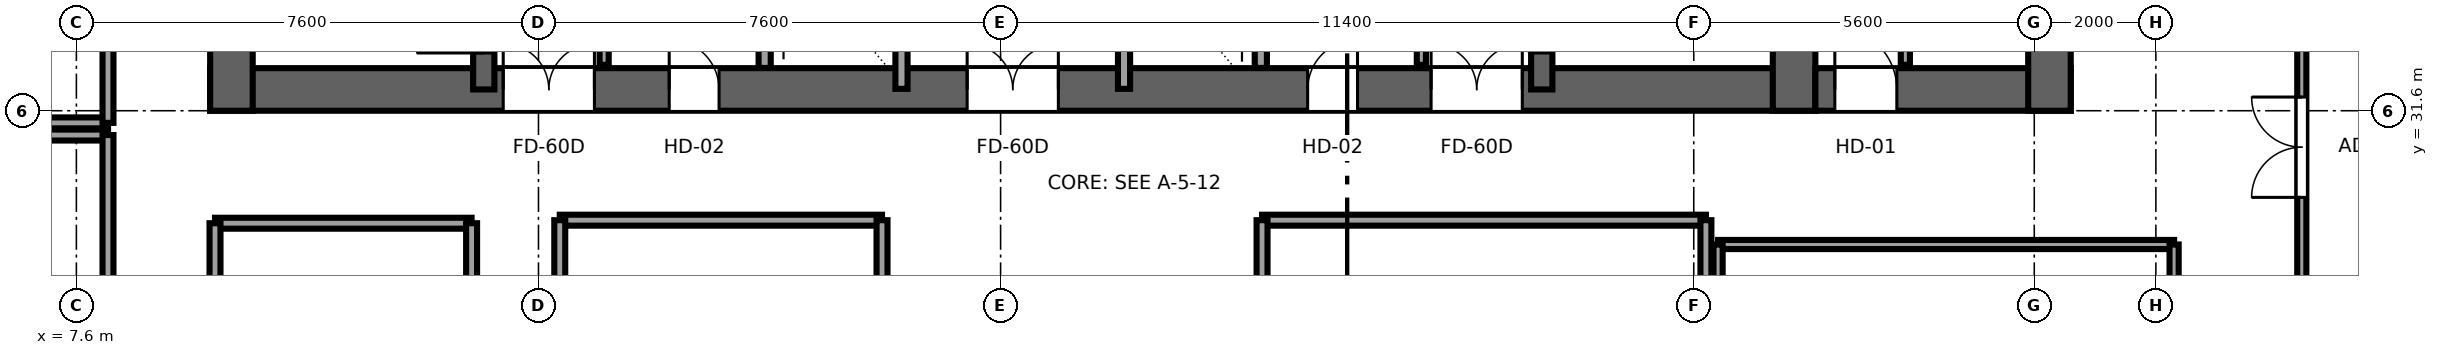
"""IFC4 building model, lengths in metres.
Left out: names, types, materials, properties, quantities, classifications, styles, units other than length and angle.
Written with IfcOpenShell. Run it as: python <this file> out.ifc"""

import sys

from ifc_helpers import new_model, si_unit, direction, frame, frame_2d, origin, place, context, subcontext, project, spatial, rectangle, extrude, source, transform, mapped, element, fill, save


model = new_model("IFC4")
c1 = context("Model", 3, precision=1e-05, world=origin(), true_north=direction((0.0, 1.0)))
c2 = subcontext(c1, "Body", "Model", "MODEL_VIEW")
j1 = project(units=[si_unit("LENGTHUNIT", "METRE"), si_unit("PLANEANGLEUNIT", "RADIAN")], contexts=[c1])
p1 = place(None, origin())
s1 = spatial("IfcSite", under=j1, at=p1, CompositionType="ELEMENT")
p2 = place(p1, origin())
s2 = spatial("IfcBuilding", under=s1, at=p2, CompositionType="ELEMENT")
p3 = place(p2, frame((0.0, 0.0, 125.75)))
s3 = spatial("IfcBuildingStorey", under=s2, at=p3, CompositionType="ELEMENT", Elevation=125.75)
p4 = place(p3, frame((9.8, 31.95, 0.0), z_axis=(0.0, 0.0, 1.0), x_axis=(1.0, 0.0, 0.0)))
e1 = element("IfcWall", 1, at=p4, inside=s3, PredefinedType="SHEAR", context=c2, shape_type="SweptSolid", body=[
    extrude(rectangle(XDim=26.4, YDim=0.7, at=frame_2d((13.2, 0.0))), origin(), (0.0, 0.0, 1.0), 3.55),
])
p5 = place(p4, frame((6.32, 0.0, 0.0), z_axis=(0.0, 0.0, 1.0), x_axis=(-1.0, 0.0, 0.0)))
e2 = element("IfcOpeningElement", 2, at=p5, cuts=e1, PredefinedType="OPENING", context=c2, shape_type="SweptSolid", body=[
    extrude(rectangle(XDim=1.5, YDim=2.04, at=frame_2d((0.75, 1.02))), frame((0.0, 0.36, 0.0), z_axis=(0.0, -1.0, 0.0), x_axis=(1.0, 0.0, 0.0)), (0.0, 0.0, 1.0), 0.72),
])
p6 = place(p4, frame((13.95, 0.0, 0.0), z_axis=(0.0, 0.0, 1.0), x_axis=(-1.0, 0.0, 0.0)))
e3 = element("IfcOpeningElement", 3, at=p6, cuts=e1, PredefinedType="OPENING", context=c2, shape_type="SweptSolid", body=[
    extrude(rectangle(XDim=1.5, YDim=2.04, at=frame_2d((0.75, 1.02))), frame((0.0, 0.36, 0.0), z_axis=(0.0, -1.0, 0.0), x_axis=(1.0, 0.0, 0.0)), (0.0, 0.0, 1.0), 0.72),
])
p7 = place(p4, frame((21.58, 0.0, 0.0), z_axis=(0.0, 0.0, 1.0), x_axis=(-1.0, 0.0, 0.0)))
e4 = element("IfcOpeningElement", 4, at=p7, cuts=e1, PredefinedType="OPENING", context=c2, shape_type="SweptSolid", body=[
    extrude(rectangle(XDim=1.5, YDim=2.04, at=frame_2d((0.75, 1.02))), frame((0.0, 0.36, 0.0), z_axis=(0.0, -1.0, 0.0), x_axis=(1.0, 0.0, 0.0)), (0.0, 0.0, 1.0), 0.72),
])
p8 = place(p4, frame((8.37, 0.0, 0.0), z_axis=(0.0, 0.0, 1.0), x_axis=(-1.0, 0.0, 0.0)))
e5 = element("IfcOpeningElement", 5, at=p8, cuts=e1, PredefinedType="OPENING", context=c2, shape_type="SweptSolid", body=[
    extrude(rectangle(XDim=0.82, YDim=2.01, at=frame_2d((0.41, 1.005))), frame((0.0, 0.36, 0.0), z_axis=(0.0, -1.0, 0.0), x_axis=(1.0, 0.0, 0.0)), (0.0, 0.0, 1.0), 0.72),
])
p9 = place(p4, frame((18.87, 0.0, 0.0), z_axis=(0.0, 0.0, 1.0), x_axis=(-1.0, 0.0, 0.0)))
e6 = element("IfcOpeningElement", 6, at=p9, cuts=e1, PredefinedType="OPENING", context=c2, shape_type="SweptSolid", body=[
    extrude(rectangle(XDim=0.82, YDim=2.01, at=frame_2d((0.41, 1.005))), frame((0.0, 0.36, 0.0), z_axis=(0.0, -1.0, 0.0), x_axis=(1.0, 0.0, 0.0)), (0.0, 0.0, 1.0), 0.72),
])
for number, where, z_axis, x_axis in (
    (7, (10.15, 31.6, 0.0), (0.0, 0.0, 1.0), (0.0, 1.0, 0.0)),
    (8, (35.85, 31.6, 0.0), (0.0, 0.0, 1.0), (0.0, 1.0, 0.0)),
):
    element("IfcWall", number, at=place(p3, frame(where, z_axis=z_axis, x_axis=x_axis)), inside=s3, PredefinedType="SHEAR", context=c2, shape_type="SweptSolid", body=[
        extrude(rectangle(XDim=13.6, YDim=0.7, at=frame_2d((6.8, 0.0))), origin(), (0.0, 0.0, 1.0), 3.55),
    ])
p10 = place(p3, frame((14.3, 31.95, 0.0), z_axis=(0.0, 0.0, 1.0), x_axis=(0.0, 1.0, 0.0)))
e9 = element("IfcWall", 9, at=p10, inside=s3, PredefinedType="SHEAR", context=c2, shape_type="SweptSolid", body=[
    extrude(rectangle(XDim=12.9, YDim=0.35, at=frame_2d((6.45, 0.0))), origin(), (0.0, 0.0, 1.0), 3.55),
])
p11 = place(p10, frame((0.6, 0.0, 0.0)))
e10 = element("IfcOpeningElement", 10, at=p11, cuts=e9, PredefinedType="OPENING", context=c2, shape_type="SweptSolid", body=[
    extrude(rectangle(XDim=1.1, YDim=2.12, at=frame_2d((0.55, 1.06))), frame((0.0, 0.185, 0.0), z_axis=(0.0, -1.0, 0.0), x_axis=(1.0, 0.0, 0.0)), (0.0, 0.0, 1.0), 0.37),
])
p12 = place(p3, frame((31.7, 31.95, 0.0), z_axis=(0.0, 0.0, 1.0), x_axis=(0.0, 1.0, 0.0)))
e11 = element("IfcWall", 11, at=p12, inside=s3, PredefinedType="SHEAR", context=c2, shape_type="SweptSolid", body=[
    extrude(rectangle(XDim=12.9, YDim=0.35, at=frame_2d((6.45, 0.0))), origin(), (0.0, 0.0, 1.0), 3.55),
])
p13 = place(p12, frame((1.7, 0.0, 0.0), z_axis=(0.0, 0.0, 1.0), x_axis=(-1.0, 0.0, 0.0)))
e12 = element("IfcOpeningElement", 12, at=p13, cuts=e11, PredefinedType="OPENING", context=c2, shape_type="SweptSolid", body=[
    extrude(rectangle(XDim=1.1, YDim=2.12, at=frame_2d((0.55, 1.06))), frame((0.0, 0.185, 0.0), z_axis=(0.0, -1.0, 0.0), x_axis=(1.0, 0.0, 0.0)), (0.0, 0.0, 1.0), 0.37),
])
p14 = place(p3, frame((36.2, 31.95, 0.0), z_axis=(0.0, 0.0, 1.0), x_axis=(1.0, 0.0, 0.0)))
e13 = element("IfcWall", 13, at=p14, inside=s3, PredefinedType="SHEAR", context=c2, shape_type="SweptSolid", body=[
    extrude(rectangle(XDim=4.2, YDim=0.7, at=frame_2d((2.1, 0.0))), origin(), (0.0, 0.0, 1.0), 3.55),
])
p15 = place(p14, frame((1.34, 0.0, 0.0), z_axis=(0.0, 0.0, 1.0), x_axis=(-1.0, 0.0, 0.0)))
e14 = element("IfcOpeningElement", 14, at=p15, cuts=e13, PredefinedType="OPENING", context=c2, shape_type="SweptSolid", body=[
    extrude(rectangle(XDim=1.02, YDim=2.03, at=frame_2d((0.51, 1.015))), frame((0.0, 0.36, 0.0), z_axis=(0.0, -1.0, 0.0), x_axis=(1.0, 0.0, 0.0)), (0.0, 0.0, 1.0), 0.72),
])
p16 = place(p3, frame((40.05, 31.6, 0.0), z_axis=(0.0, 0.0, 1.0), x_axis=(0.0, 1.0, 0.0)))
e15 = element("IfcWall", 15, at=p16, inside=s3, PredefinedType="SHEAR", context=c2, shape_type="SweptSolid", body=[
    extrude(rectangle(XDim=13.6, YDim=0.7, at=frame_2d((6.8, 0.0))), origin(), (0.0, 0.0, 1.0), 3.55),
])
for number, where, z_axis, x_axis in (
    (16, (18.92, 32.304, 0.0), (0.0, 0.0, 1.0), (0.0, 1.0, 0.0)),
    (17, (27.08, 32.304, 0.0), (0.0, 0.0, 1.0), (0.0, 1.0, 0.0)),
):
    element("IfcWall", number, at=place(p3, frame(where, z_axis=z_axis, x_axis=x_axis)), inside=s3, PredefinedType="SOLIDWALL", context=c2, shape_type="SweptSolid", body=[
        extrude(rectangle(XDim=3.846, YDim=0.2, at=frame_2d((1.923, 0.0))), origin(), (0.0, 0.0, 1.0), 3.37),
    ])
p17 = place(p3, frame((21.17, 31.96, 0.0), z_axis=(0.0, 0.0, 1.0), x_axis=(0.0, 1.0, 0.0)))
e18 = element("IfcWall", 18, at=p17, inside=s3, PredefinedType="SOLIDWALL", context=c2, shape_type="SweptSolid", body=[
    extrude(rectangle(XDim=12.58, YDim=0.2, at=frame_2d((6.29, 0.0))), origin(), (0.0, 0.0, 1.0), 3.37),
])
p18 = place(p17, frame((5.74, 0.0, 0.0)))
e19 = element("IfcOpeningElement", 19, at=p18, cuts=e18, PredefinedType="OPENING", context=c2, shape_type="SweptSolid", body=[
    extrude(rectangle(XDim=1.1, YDim=2.12, at=frame_2d((0.55, 1.06))), frame((0.0, 0.11, 0.0), z_axis=(0.0, -1.0, 0.0), x_axis=(1.0, 0.0, 0.0)), (0.0, 0.0, 1.0), 0.22),
])
p19 = place(p17, frame((8.24, 0.0, 0.0)))
e20 = element("IfcOpeningElement", 20, at=p19, cuts=e18, PredefinedType="OPENING", context=c2, shape_type="SweptSolid", body=[
    extrude(rectangle(XDim=1.1, YDim=2.12, at=frame_2d((0.55, 1.06))), frame((0.0, 0.11, 0.0), z_axis=(0.0, -1.0, 0.0), x_axis=(1.0, 0.0, 0.0)), (0.0, 0.0, 1.0), 0.22),
])
p20 = place(p3, frame((24.83, 31.96, 0.0), z_axis=(0.0, 0.0, 1.0), x_axis=(0.0, 1.0, 0.0)))
e21 = element("IfcWall", 21, at=p20, inside=s3, PredefinedType="SOLIDWALL", context=c2, shape_type="SweptSolid", body=[
    extrude(rectangle(XDim=12.58, YDim=0.2, at=frame_2d((6.29, 0.0))), origin(), (0.0, 0.0, 1.0), 3.37),
])
p21 = place(p20, frame((5.74, 0.0, 0.0)))
e22 = element("IfcOpeningElement", 22, at=p21, cuts=e21, PredefinedType="OPENING", context=c2, shape_type="SweptSolid", body=[
    extrude(rectangle(XDim=1.1, YDim=2.12, at=frame_2d((0.55, 1.06))), frame((0.0, 0.11, 0.0), z_axis=(0.0, -1.0, 0.0), x_axis=(1.0, 0.0, 0.0)), (0.0, 0.0, 1.0), 0.22),
])
p22 = place(p20, frame((8.24, 0.0, 0.0)))
e23 = element("IfcOpeningElement", 23, at=p22, cuts=e21, PredefinedType="OPENING", context=c2, shape_type="SweptSolid", body=[
    extrude(rectangle(XDim=1.1, YDim=2.12, at=frame_2d((0.55, 1.06))), frame((0.0, 0.11, 0.0), z_axis=(0.0, -1.0, 0.0), x_axis=(1.0, 0.0, 0.0)), (0.0, 0.0, 1.0), 0.22),
])
for number, where, z_axis, x_axis in (
    (24, (16.28, 32.355, 0.0), (0.0, 0.0, 1.0), (0.0, 1.0, 0.0)),
    (25, (29.72, 32.355, 0.0), (0.0, 0.0, 1.0), (0.0, 1.0, 0.0)),
):
    element("IfcWall", number, at=place(p3, frame(where, z_axis=z_axis, x_axis=x_axis)), inside=s3, PredefinedType="PARTITIONING", context=c2, shape_type="SweptSolid", body=[
        extrude(rectangle(XDim=0.865, YDim=0.15, at=frame_2d((0.433, 0.0))), origin(), (0.0, 0.0, 1.0), 3.37),
    ])
p23 = place(p3, frame((37.68, 32.355, 0.0), z_axis=(0.0, 0.0, 1.0), x_axis=(0.0, 1.0, 0.0)))
e26 = element("IfcWall", 26, at=p23, inside=s3, PredefinedType="PARTITIONING", context=c2, shape_type="SweptSolid", body=[
    extrude(rectangle(XDim=7.845, YDim=0.15, at=frame_2d((3.922, 0.0))), origin(), (0.0, 0.0, 1.0), 3.37),
])
p24 = place(p23, frame((3.413, 0.0, 0.0)))
e27 = element("IfcOpeningElement", 27, at=p24, cuts=e26, PredefinedType="OPENING", context=c2, shape_type="SweptSolid", body=[
    extrude(rectangle(XDim=1.02, YDim=2.03, at=frame_2d((0.51, 1.015))), frame((0.0, 0.085, 0.0), z_axis=(0.0, -1.0, 0.0), x_axis=(1.0, 0.0, 0.0)), (0.0, 0.0, 1.0), 0.17),
])
p25 = place(p3, frame((0.405, 31.2, 0.0), z_axis=(0.0, 0.0, 1.0), x_axis=(1.0, 0.0, 0.0)))
e28 = element("IfcWall", 28, at=p25, inside=s3, PredefinedType="PARTITIONING", context=c2, shape_type="SweptSolid", body=[
    extrude(rectangle(XDim=7.715, YDim=0.18, at=frame_2d((3.857, 0.0))), origin(), (0.0, 0.0, 1.0), 3.37),
])
p26 = place(p3, frame((8.12, 23.6, 0.0), z_axis=(0.0, 0.0, 1.0), x_axis=(0.0, 1.0, 0.0)))
e29 = element("IfcWall", 29, at=p26, inside=s3, PredefinedType="PARTITIONING", context=c2, shape_type="SweptSolid", body=[
    extrude(rectangle(XDim=7.6, YDim=0.18, at=frame_2d((3.8, 0.0))), origin(), (0.0, 0.0, 1.0), 3.37),
])
p27 = place(p26, frame((2.975, 0.0, 0.0)))
e30 = element("IfcOpeningElement", 30, at=p27, cuts=e29, PredefinedType="OPENING", context=c2, shape_type="SweptSolid", body=[
    extrude(rectangle(XDim=1.65, YDim=2.15, at=frame_2d((0.825, 1.075))), frame((0.0, 0.1, 0.0), z_axis=(0.0, -1.0, 0.0), x_axis=(1.0, 0.0, 0.0)), (0.0, 0.0, 1.0), 0.2),
])
p28 = place(p3, frame((0.405, 31.4, 0.0), z_axis=(0.0, 0.0, 1.0), x_axis=(1.0, 0.0, 0.0)))
e31 = element("IfcWall", 31, at=p28, inside=s3, PredefinedType="PARTITIONING", context=c2, shape_type="SweptSolid", body=[
    extrude(rectangle(XDim=7.715, YDim=0.18, at=frame_2d((3.857, 0.0))), origin(), (0.0, 0.0, 1.0), 3.37),
])
p29 = place(p3, frame((8.12, 31.4, 0.0), z_axis=(0.0, 0.0, 1.0), x_axis=(0.0, 1.0, 0.0)))
e32 = element("IfcWall", 32, at=p29, inside=s3, PredefinedType="PARTITIONING", context=c2, shape_type="SweptSolid", body=[
    extrude(rectangle(XDim=6.8, YDim=0.18, at=frame_2d((3.4, 0.0))), origin(), (0.0, 0.0, 1.0), 3.37),
])
p30 = place(p29, frame((3.175, 0.0, 0.0)))
e33 = element("IfcOpeningElement", 33, at=p30, cuts=e32, PredefinedType="OPENING", context=c2, shape_type="SweptSolid", body=[
    extrude(rectangle(XDim=1.65, YDim=2.15, at=frame_2d((0.825, 1.075))), frame((0.0, 0.1, 0.0), z_axis=(0.0, -1.0, 0.0), x_axis=(1.0, 0.0, 0.0)), (0.0, 0.0, 1.0), 0.2),
])
p31 = place(p3, frame((44.2, 27.4, 0.0), z_axis=(0.0, 0.0, 1.0), x_axis=(0.0, 1.0, 0.0)))
e34 = element("IfcWall", 34, at=p31, inside=s3, PredefinedType="PARTITIONING", context=c2, shape_type="SweptSolid", body=[
    extrude(rectangle(XDim=7.2, YDim=0.15, at=frame_2d((3.6, 0.0))), origin(), (0.0, 0.0, 1.0), 3.37),
])
p32 = place(p31, frame((2.775, 0.0, 0.0)))
e35 = element("IfcOpeningElement", 35, at=p32, cuts=e34, PredefinedType="OPENING", context=c2, shape_type="SweptSolid", body=[
    extrude(rectangle(XDim=1.65, YDim=2.15, at=frame_2d((0.825, 1.075))), frame((0.0, 0.085, 0.0), z_axis=(0.0, -1.0, 0.0), x_axis=(1.0, 0.0, 0.0)), (0.0, 0.0, 1.0), 0.17),
])
p33 = place(p3, frame((9.88, 29.75, 0.0), z_axis=(0.0, 0.0, 1.0), x_axis=(1.0, 0.0, 0.0)))
e36 = element("IfcWall", 36, at=p33, inside=s3, PredefinedType="PARTITIONING", context=c2, shape_type="SweptSolid", body=[
    extrude(rectangle(XDim=4.22, YDim=0.18, at=frame_2d((2.11, 0.0))), origin(), (0.0, 0.0, 1.0), 3.37),
])
for number, where, z_axis, x_axis in (
    (37, (9.88, 23.6, 0.0), (0.0, 0.0, 1.0), (0.0, 1.0, 0.0)),
    (38, (14.1, 23.6, 0.0), (0.0, 0.0, 1.0), (0.0, 1.0, 0.0)),
):
    element("IfcWall", number, at=place(p3, frame(where, z_axis=z_axis, x_axis=x_axis)), inside=s3, PredefinedType="PARTITIONING", context=c2, shape_type="SweptSolid", body=[
        extrude(rectangle(XDim=6.15, YDim=0.18, at=frame_2d((3.075, 0.0))), origin(), (0.0, 0.0, 1.0), 3.37),
    ])
p34 = place(p3, frame((27.1, 29.8, 0.0), z_axis=(0.0, 0.0, 1.0), x_axis=(1.0, 0.0, 0.0)))
e39 = element("IfcWall", 39, at=p34, inside=s3, PredefinedType="PARTITIONING", context=c2, shape_type="SweptSolid", body=[
    extrude(rectangle(XDim=7.3, YDim=0.18, at=frame_2d((3.65, 0.0))), origin(), (0.0, 0.0, 1.0), 3.37),
])
for number, where, z_axis, x_axis in (
    (40, (27.1, 23.6, 0.0), (0.0, 0.0, 1.0), (0.0, 1.0, 0.0)),
    (41, (34.4, 23.6, 0.0), (0.0, 0.0, 1.0), (0.0, 1.0, 0.0)),
):
    element("IfcWall", number, at=place(p3, frame(where, z_axis=z_axis, x_axis=x_axis)), inside=s3, PredefinedType="PARTITIONING", context=c2, shape_type="SweptSolid", body=[
        extrude(rectangle(XDim=6.2, YDim=0.18, at=frame_2d((3.1, 0.0))), origin(), (0.0, 0.0, 1.0), 3.37),
    ])
p35 = place(p3, frame((15.55, 29.8, 0.0), z_axis=(0.0, 0.0, 1.0), x_axis=(1.0, 0.0, 0.0)))
e42 = element("IfcWall", 42, at=p35, inside=s3, PredefinedType="PARTITIONING", context=c2, shape_type="SweptSolid", body=[
    extrude(rectangle(XDim=5.3, YDim=0.18, at=frame_2d((2.65, 0.0))), origin(), (0.0, 0.0, 1.0), 3.37),
])
for number, where, z_axis, x_axis in (
    (43, (15.55, 23.6, 0.0), (0.0, 0.0, 1.0), (0.0, 1.0, 0.0)),
    (44, (20.85, 23.6, 0.0), (0.0, 0.0, 1.0), (0.0, 1.0, 0.0)),
):
    element("IfcWall", number, at=place(p3, frame(where, z_axis=z_axis, x_axis=x_axis)), inside=s3, PredefinedType="PARTITIONING", context=c2, shape_type="SweptSolid", body=[
        extrude(rectangle(XDim=6.2, YDim=0.18, at=frame_2d((3.1, 0.0))), origin(), (0.0, 0.0, 1.0), 3.37),
    ])
p36 = place(p3, frame((34.6, 29.4, 0.0), z_axis=(0.0, 0.0, 1.0), x_axis=(1.0, 0.0, 0.0)))
e45 = element("IfcWall", 45, at=p36, inside=s3, PredefinedType="PARTITIONING", context=c2, shape_type="SweptSolid", body=[
    extrude(rectangle(XDim=7.5, YDim=0.15, at=frame_2d((3.75, 0.0))), origin(), (0.0, 0.0, 1.0), 3.37),
])
p37 = place(p3, frame((34.6, 23.6, 0.0), z_axis=(0.0, 0.0, 1.0), x_axis=(0.0, 1.0, 0.0)))
e46 = element("IfcWall", 46, at=p37, inside=s3, PredefinedType="PARTITIONING", context=c2, shape_type="SweptSolid", body=[
    extrude(rectangle(XDim=5.8, YDim=0.15, at=frame_2d((2.9, 0.0))), origin(), (0.0, 0.0, 1.0), 3.37),
])
p38 = place(p3, frame((42.1, 23.6, 0.0), z_axis=(0.0, 0.0, 1.0), x_axis=(0.0, 1.0, 0.0)))
e47 = element("IfcWall", 47, at=p38, inside=s3, PredefinedType="PARTITIONING", context=c2, shape_type="SweptSolid", body=[
    extrude(rectangle(XDim=5.8, YDim=0.15, at=frame_2d((2.9, 0.0))), origin(), (0.0, 0.0, 1.0), 2.16),
])
m1 = source(origin(), c2, "Body", "SweptSolid", [
    extrude(rectangle(XDim=1.1, YDim=2.12, at=frame_2d((0.55, 1.06))), frame((0.0, 0.025, 0.0), z_axis=(0.0, -1.0, 0.0), x_axis=(1.0, 0.0, 0.0)), (0.0, 0.0, 1.0), 0.05),
])
p39 = place(p11, origin())
e48 = element("IfcDoor", 48, at=p39, inside=s3, OperationType="SINGLE_SWING_LEFT", PredefinedType="DOOR", context=c2, shape_type="MappedRepresentation", body=[
    mapped(m1, transform((0.0, 0.0, 0.0), x_axis=(1.0, 0.0, 0.0), y_axis=(0.0, 1.0, 0.0), z_axis=(0.0, 0.0, 1.0), scale=1.0)),
])
fill(e10, e48)
p40 = place(p13, origin())
e49 = element("IfcDoor", 49, at=p40, inside=s3, OperationType="SINGLE_SWING_RIGHT", PredefinedType="DOOR", context=c2, shape_type="MappedRepresentation", body=[
    mapped(m1, transform((0.0, 0.0, 0.0), x_axis=(1.0, 0.0, 0.0), y_axis=(0.0, 1.0, 0.0), z_axis=(0.0, 0.0, 1.0), scale=1.0)),
])
fill(e12, e49)
m2 = source(origin(), c2, "Body", "SweptSolid", [
    extrude(rectangle(XDim=1.5, YDim=2.04, at=frame_2d((0.75, 1.02))), frame((0.0, 0.025, 0.0), z_axis=(0.0, -1.0, 0.0), x_axis=(1.0, 0.0, 0.0)), (0.0, 0.0, 1.0), 0.05),
])
p41 = place(p5, origin())
e50 = element("IfcDoor", 50, at=p41, inside=s3, OperationType="DOUBLE_DOOR_SINGLE_SWING", PredefinedType="DOOR", context=c2, shape_type="MappedRepresentation", body=[
    mapped(m2, transform((0.0, 0.0, 0.0), x_axis=(1.0, 0.0, 0.0), y_axis=(0.0, 1.0, 0.0), z_axis=(0.0, 0.0, 1.0), scale=1.0)),
])
fill(e2, e50)
p42 = place(p6, origin())
e51 = element("IfcDoor", 51, at=p42, inside=s3, OperationType="DOUBLE_DOOR_SINGLE_SWING", PredefinedType="DOOR", context=c2, shape_type="MappedRepresentation", body=[
    mapped(m2, transform((0.0, 0.0, 0.0), x_axis=(1.0, 0.0, 0.0), y_axis=(0.0, 1.0, 0.0), z_axis=(0.0, 0.0, 1.0), scale=1.0)),
])
fill(e3, e51)
p43 = place(p7, origin())
e52 = element("IfcDoor", 52, at=p43, inside=s3, OperationType="DOUBLE_DOOR_SINGLE_SWING", PredefinedType="DOOR", context=c2, shape_type="MappedRepresentation", body=[
    mapped(m2, transform((0.0, 0.0, 0.0), x_axis=(1.0, 0.0, 0.0), y_axis=(0.0, 1.0, 0.0), z_axis=(0.0, 0.0, 1.0), scale=1.0)),
])
fill(e4, e52)
m3 = source(origin(), c2, "Body", "SweptSolid", [
    extrude(rectangle(XDim=0.82, YDim=2.01, at=frame_2d((0.41, 1.005))), frame((0.0, 0.025, 0.0), z_axis=(0.0, -1.0, 0.0), x_axis=(1.0, 0.0, 0.0)), (0.0, 0.0, 1.0), 0.05),
])
p44 = place(p8, origin())
e53 = element("IfcDoor", 53, at=p44, inside=s3, OperationType="SINGLE_SWING_LEFT", PredefinedType="DOOR", context=c2, shape_type="MappedRepresentation", body=[
    mapped(m3, transform((0.0, 0.0, 0.0), x_axis=(1.0, 0.0, 0.0), y_axis=(0.0, 1.0, 0.0), z_axis=(0.0, 0.0, 1.0), scale=1.0)),
])
fill(e5, e53)
p45 = place(p9, origin())
e54 = element("IfcDoor", 54, at=p45, inside=s3, OperationType="SINGLE_SWING_RIGHT", PredefinedType="DOOR", context=c2, shape_type="MappedRepresentation", body=[
    mapped(m3, transform((0.0, 0.0, 0.0), x_axis=(1.0, 0.0, 0.0), y_axis=(0.0, 1.0, 0.0), z_axis=(0.0, 0.0, 1.0), scale=1.0)),
])
fill(e6, e54)
m4 = source(origin(), c2, "Body", "SweptSolid", [
    extrude(rectangle(XDim=1.02, YDim=2.03, at=frame_2d((0.51, 1.015))), frame((0.0, 0.025, 0.0), z_axis=(0.0, -1.0, 0.0), x_axis=(1.0, 0.0, 0.0)), (0.0, 0.0, 1.0), 0.05),
])
p46 = place(p15, origin())
e55 = element("IfcDoor", 55, at=p46, inside=s3, OperationType="SINGLE_SWING_LEFT", PredefinedType="DOOR", context=c2, shape_type="MappedRepresentation", body=[
    mapped(m4, transform((0.0, 0.0, 0.0), x_axis=(1.0, 0.0, 0.0), y_axis=(0.0, 1.0, 0.0), z_axis=(0.0, 0.0, 1.0), scale=1.0)),
])
fill(e14, e55)
m5 = source(origin(), c2, "Body", "SweptSolid", [
    extrude(rectangle(XDim=1.65, YDim=2.15, at=frame_2d((0.825, 1.075))), frame((0.0, 0.025, 0.0), z_axis=(0.0, -1.0, 0.0), x_axis=(1.0, 0.0, 0.0)), (0.0, 0.0, 1.0), 0.05),
])
p47 = place(p32, origin())
e56 = element("IfcDoor", 56, at=p47, inside=s3, OperationType="DOUBLE_DOOR_SINGLE_SWING", PredefinedType="DOOR", context=c2, shape_type="MappedRepresentation", body=[
    mapped(m5, transform((0.0, 0.0, 0.0), x_axis=(1.0, 0.0, 0.0), y_axis=(0.0, 1.0, 0.0), z_axis=(0.0, 0.0, 1.0), scale=1.0)),
])
fill(e35, e56)
save(model, sys.argv[1])
